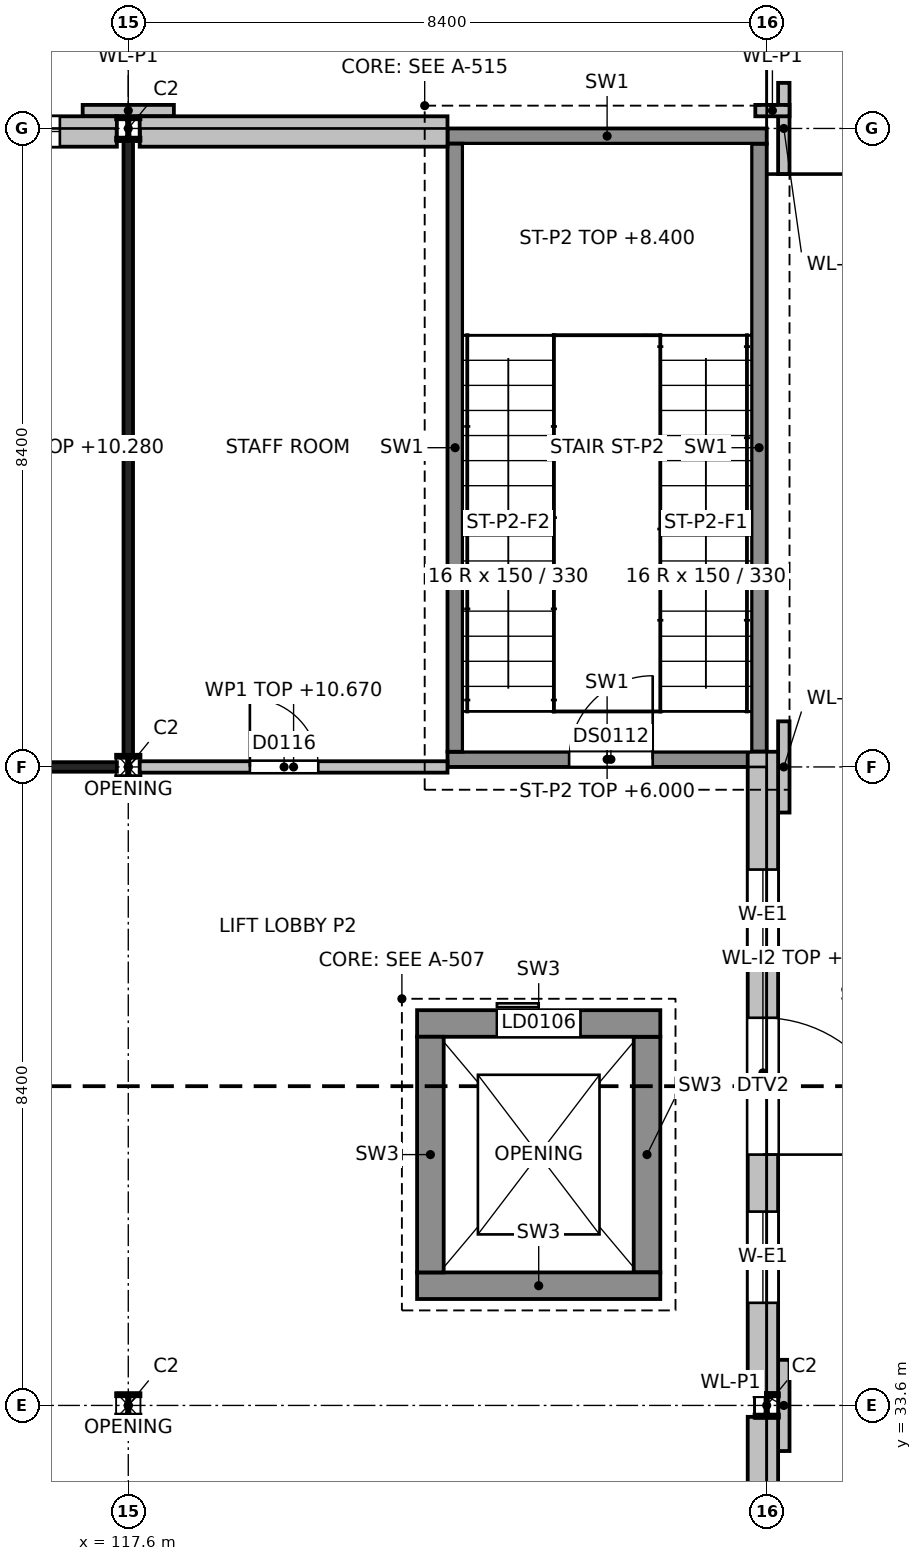
"""IFC4 building model, lengths in metres.
Left out: names, types, materials, properties, quantities, classifications, styles, units other than length and angle.
Written with IfcOpenShell. Run it as: python <this file> out.ifc"""

import sys

from ifc_helpers import new_model, si_unit, direction, frame, frame_2d, origin, origin_2d, place, context, subcontext, project, spatial, rectangle, i_section, extrude, element, fill, save


model = new_model("IFC4")
c1 = context("Model", 3, precision=1e-05, world=origin(), true_north=direction((0.0, 1.0)))
c2 = subcontext(c1, "Body", "Model", "MODEL_VIEW")
j1 = project(units=[si_unit("LENGTHUNIT", "METRE"), si_unit("PLANEANGLEUNIT", "RADIAN")], contexts=[c1])
p1 = place(None, origin())
s1 = spatial("IfcSite", under=j1, at=p1, CompositionType="ELEMENT")
p2 = place(p1, origin())
s2 = spatial("IfcBuilding", under=s1, at=p2, CompositionType="ELEMENT")
p3 = place(p2, frame((0.0, 0.0, 6.0)))
s3 = spatial("IfcBuildingStorey", under=s2, at=p3, CompositionType="ELEMENT", Elevation=6.0)
for number, where, z_axis, x_axis in (
    (1, (117.6, 33.6, 0.0), (0.0, 0.0, 1.0), (1.0, 0.0, 0.0)),
    (2, (117.6, 42.0, 0.0), (0.0, 0.0, 1.0), (1.0, 0.0, 0.0)),
    (3, (117.6, 50.4, 0.0), (0.0, 0.0, 1.0), (1.0, 0.0, 0.0)),
    (4, (126.0, 33.6, 0.0), (0.0, 0.0, 1.0), (1.0, 0.0, 0.0)),
):
    element("IfcColumn", number, at=place(p3, frame(where, z_axis=z_axis, x_axis=x_axis)), inside=s3, PredefinedType="COLUMN", context=c2, shape_type="SweptSolid", body=[
        extrude(i_section(OverallWidth=0.3, OverallDepth=0.3, WebThickness=0.011, FlangeThickness=0.019, at=origin_2d()), origin(), (0.0, 0.0, 1.0), 4.8),
    ])
p4 = place(p3, frame((121.8, 42.1, 0.0), z_axis=(0.0, 0.0, 1.0), x_axis=(1.0, 0.0, 0.0)))
e5 = element("IfcWall", 5, at=p4, inside=s3, PredefinedType="SHEAR", context=c2, shape_type="SweptSolid", body=[
    extrude(rectangle(XDim=4.2, YDim=0.2, at=frame_2d((2.1, 0.0))), origin(), (0.0, 0.0, 1.0), 4.8),
])
p5 = place(p4, frame((1.6, 0.0, 0.0)))
e6 = element("IfcOpeningElement", 6, at=p5, cuts=e5, PredefinedType="OPENING", context=c2, shape_type="SweptSolid", body=[
    extrude(rectangle(XDim=1.1, YDim=2.1, at=frame_2d((0.55, 1.05))), frame((0.0, 0.1, 0.0), z_axis=(0.0, -1.0, 0.0), x_axis=(1.0, 0.0, 0.0)), (0.0, 0.0, 1.0), 0.2),
])
p6 = place(p3, frame((121.8, 50.3, 0.0), z_axis=(0.0, 0.0, 1.0), x_axis=(1.0, 0.0, 0.0)))
e7 = element("IfcWall", 7, at=p6, inside=s3, PredefinedType="SHEAR", context=c2, shape_type="SweptSolid", body=[
    extrude(rectangle(XDim=4.2, YDim=0.2, at=frame_2d((2.1, 0.0))), origin(), (0.0, 0.0, 1.0), 4.8),
])
for number, where, z_axis, x_axis in (
    (8, (121.9, 42.2, 0.0), (0.0, 0.0, 1.0), (0.0, 1.0, 0.0)),
    (9, (125.9, 42.2, 0.0), (0.0, 0.0, 1.0), (0.0, 1.0, 0.0)),
):
    element("IfcWall", number, at=place(p3, frame(where, z_axis=z_axis, x_axis=x_axis)), inside=s3, PredefinedType="SHEAR", context=c2, shape_type="SweptSolid", body=[
        extrude(rectangle(XDim=8.0, YDim=0.2, at=frame_2d((4.0, 0.0))), origin(), (0.0, 0.0, 1.0), 4.8),
    ])
p7 = place(p3, frame((121.4, 35.175, 0.0), z_axis=(0.0, 0.0, 1.0), x_axis=(1.0, 0.0, 0.0)))
e10 = element("IfcWall", 10, at=p7, inside=s3, PredefinedType="SHEAR", context=c2, shape_type="SweptSolid", body=[
    extrude(rectangle(XDim=3.2, YDim=0.35, at=frame_2d((1.6, 0.0))), origin(), (0.0, 0.0, 1.0), 4.8),
])
p8 = place(p3, frame((121.4, 38.625, 0.0), z_axis=(0.0, 0.0, 1.0), x_axis=(1.0, 0.0, 0.0)))
e11 = element("IfcWall", 11, at=p8, inside=s3, PredefinedType="SHEAR", context=c2, shape_type="SweptSolid", body=[
    extrude(rectangle(XDim=3.2, YDim=0.35, at=frame_2d((1.6, 0.0))), origin(), (0.0, 0.0, 1.0), 4.8),
])
p9 = place(p8, frame((1.05, 0.0, 0.0)))
e12 = element("IfcOpeningElement", 12, at=p9, cuts=e11, PredefinedType="OPENING", context=c2, shape_type="SweptSolid", body=[
    extrude(rectangle(XDim=1.1, YDim=2.1, at=frame_2d((0.55, 1.05))), frame((0.0, 0.175, 0.0), z_axis=(0.0, -1.0, 0.0), x_axis=(1.0, 0.0, 0.0)), (0.0, 0.0, 1.0), 0.35),
])
for number, where, z_axis, x_axis in (
    (13, (121.575, 35.35, 0.0), (0.0, 0.0, 1.0), (0.0, 1.0, 0.0)),
    (14, (124.425, 35.35, 0.0), (0.0, 0.0, 1.0), (0.0, 1.0, 0.0)),
):
    element("IfcWall", number, at=place(p3, frame(where, z_axis=z_axis, x_axis=x_axis)), inside=s3, PredefinedType="SHEAR", context=c2, shape_type="SweptSolid", body=[
        extrude(rectangle(XDim=3.1, YDim=0.35, at=frame_2d((1.55, 0.0))), origin(), (0.0, 0.0, 1.0), 4.8),
    ])
p10 = place(p3, frame((109.2, 50.36, 0.0), z_axis=(0.0, 0.0, 1.0), x_axis=(1.0, 0.0, 0.0)))
e15 = element("IfcWall", 15, at=p10, inside=s3, PredefinedType="SOLIDWALL", context=c2, shape_type="SweptSolid", body=[
    extrude(rectangle(XDim=8.25, YDim=0.4, at=frame_2d((4.125, 0.0))), origin(), (0.0, 0.0, 1.0), 4.05),
])
p11 = place(p10, frame((0.9, 0.0, 0.9)))
e16 = element("IfcOpeningElement", 16, at=p11, cuts=e15, PredefinedType="OPENING", context=c2, shape_type="SweptSolid", body=[
    extrude(rectangle(XDim=3.0, YDim=3.0, at=frame_2d((1.5, 1.5))), frame((0.0, 0.2, 0.0), z_axis=(0.0, -1.0, 0.0), x_axis=(1.0, 0.0, 0.0)), (0.0, 0.0, 1.0), 0.4),
])
p12 = place(p10, frame((4.5, 0.0, 0.9)))
e17 = element("IfcOpeningElement", 17, at=p12, cuts=e15, PredefinedType="OPENING", context=c2, shape_type="SweptSolid", body=[
    extrude(rectangle(XDim=3.0, YDim=3.0, at=frame_2d((1.5, 1.5))), frame((0.0, 0.2, 0.0), z_axis=(0.0, -1.0, 0.0), x_axis=(1.0, 0.0, 0.0)), (0.0, 0.0, 1.0), 0.4),
])
p13 = place(p3, frame((117.75, 50.36, 0.0), z_axis=(0.0, 0.0, 1.0), x_axis=(1.0, 0.0, 0.0)))
e18 = element("IfcWall", 18, at=p13, inside=s3, PredefinedType="SOLIDWALL", context=c2, shape_type="SweptSolid", body=[
    extrude(rectangle(XDim=4.05, YDim=0.4, at=frame_2d((2.025, 0.0))), origin(), (0.0, 0.0, 1.0), 4.05),
])
p14 = place(p3, frame((117.0, 50.635, 0.0), z_axis=(0.0, 0.0, 1.0), x_axis=(1.0, 0.0, 0.0)))
e19 = element("IfcWall", 19, at=p14, inside=s3, PredefinedType="SOLIDWALL", context=c2, shape_type="SweptSolid", body=[
    extrude(rectangle(XDim=1.2, YDim=0.15, at=frame_2d((0.6, 0.0))), origin(), (0.0, 0.0, 1.0), 4.8),
])
p15 = place(p3, frame((125.85, 50.635, 0.0), z_axis=(0.0, 0.0, 1.0), x_axis=(1.0, 0.0, 0.0)))
e20 = element("IfcWall", 20, at=p15, inside=s3, PredefinedType="SOLIDWALL", context=c2, shape_type="SweptSolid", body=[
    extrude(rectangle(XDim=0.45, YDim=0.15, at=frame_2d((0.225, 0.0))), origin(), (0.0, 0.0, 1.0), 4.8),
])
p16 = place(p3, frame((125.95, 25.35, 0.0), z_axis=(0.0, 0.0, 1.0), x_axis=(0.0, 1.0, 0.0)))
e21 = element("IfcWall", 21, at=p16, inside=s3, PredefinedType="SOLIDWALL", context=c2, shape_type="SweptSolid", body=[
    extrude(rectangle(XDim=8.1, YDim=0.4, at=frame_2d((4.05, 0.0))), origin(), (0.0, 0.0, 1.0), 4.05),
])
p17 = place(p16, frame((3.15, 0.0, 0.0)))
e22 = element("IfcOpeningElement", 22, at=p17, cuts=e21, PredefinedType="OPENING", context=c2, shape_type="SweptSolid", body=[
    extrude(rectangle(XDim=1.8, YDim=2.4, at=frame_2d((0.9, 1.2))), frame((0.0, 0.2, 0.0), z_axis=(0.0, -1.0, 0.0), x_axis=(1.0, 0.0, 0.0)), (0.0, 0.0, 1.0), 0.4),
])
p18 = place(p16, frame((1.2, 0.0, 0.9)))
e23 = element("IfcOpeningElement", 23, at=p18, cuts=e21, PredefinedType="OPENING", context=c2, shape_type="SweptSolid", body=[
    extrude(rectangle(XDim=1.2, YDim=3.0, at=frame_2d((0.6, 1.5))), frame((0.0, 0.2, 0.0), z_axis=(0.0, -1.0, 0.0), x_axis=(1.0, 0.0, 0.0)), (0.0, 0.0, 1.0), 0.4),
])
p19 = place(p16, frame((5.7, 0.0, 0.9)))
e24 = element("IfcOpeningElement", 24, at=p19, cuts=e21, PredefinedType="OPENING", context=c2, shape_type="SweptSolid", body=[
    extrude(rectangle(XDim=1.2, YDim=3.0, at=frame_2d((0.6, 1.5))), frame((0.0, 0.2, 0.0), z_axis=(0.0, -1.0, 0.0), x_axis=(1.0, 0.0, 0.0)), (0.0, 0.0, 1.0), 0.4),
])
p20 = place(p3, frame((125.95, 33.75, 0.0), z_axis=(0.0, 0.0, 1.0), x_axis=(0.0, 1.0, 0.0)))
e25 = element("IfcWall", 25, at=p20, inside=s3, PredefinedType="SOLIDWALL", context=c2, shape_type="SweptSolid", body=[
    extrude(rectangle(XDim=8.45, YDim=0.4, at=frame_2d((4.225, 0.0))), origin(), (0.0, 0.0, 1.0), 4.05),
])
p21 = place(p20, frame((3.15, 0.0, 0.0)))
e26 = element("IfcOpeningElement", 26, at=p21, cuts=e25, PredefinedType="OPENING", context=c2, shape_type="SweptSolid", body=[
    extrude(rectangle(XDim=1.8, YDim=2.4, at=frame_2d((0.9, 1.2))), frame((0.0, 0.2, 0.0), z_axis=(0.0, -1.0, 0.0), x_axis=(1.0, 0.0, 0.0)), (0.0, 0.0, 1.0), 0.4),
])
p22 = place(p20, frame((1.2, 0.0, 0.9)))
e27 = element("IfcOpeningElement", 27, at=p22, cuts=e25, PredefinedType="OPENING", context=c2, shape_type="SweptSolid", body=[
    extrude(rectangle(XDim=1.2, YDim=3.0, at=frame_2d((0.6, 1.5))), frame((0.0, 0.2, 0.0), z_axis=(0.0, -1.0, 0.0), x_axis=(1.0, 0.0, 0.0)), (0.0, 0.0, 1.0), 0.4),
])
p23 = place(p20, frame((5.7, 0.0, 0.9)))
e28 = element("IfcOpeningElement", 28, at=p23, cuts=e25, PredefinedType="OPENING", context=c2, shape_type="SweptSolid", body=[
    extrude(rectangle(XDim=1.2, YDim=3.0, at=frame_2d((0.6, 1.5))), frame((0.0, 0.2, 0.0), z_axis=(0.0, -1.0, 0.0), x_axis=(1.0, 0.0, 0.0)), (0.0, 0.0, 1.0), 0.4),
])
p24 = place(p3, frame((126.225, 33.0, 0.0), z_axis=(0.0, 0.0, 1.0), x_axis=(0.0, 1.0, 0.0)))
e29 = element("IfcWall", 29, at=p24, inside=s3, PredefinedType="SOLIDWALL", context=c2, shape_type="SweptSolid", body=[
    extrude(rectangle(XDim=1.2, YDim=0.15, at=frame_2d((0.6, 0.0))), origin(), (0.0, 0.0, 1.0), 4.8),
])
p25 = place(p3, frame((126.225, 41.4, 0.0), z_axis=(0.0, 0.0, 1.0), x_axis=(0.0, 1.0, 0.0)))
e30 = element("IfcWall", 30, at=p25, inside=s3, PredefinedType="SOLIDWALL", context=c2, shape_type="SweptSolid", body=[
    extrude(rectangle(XDim=1.2, YDim=0.15, at=frame_2d((0.6, 0.0))), origin(), (0.0, 0.0, 1.0), 4.8),
])
p26 = place(p3, frame((126.225, 49.8, 0.0), z_axis=(0.0, 0.0, 1.0), x_axis=(0.0, 1.0, 0.0)))
e31 = element("IfcWall", 31, at=p26, inside=s3, PredefinedType="SOLIDWALL", context=c2, shape_type="SweptSolid", body=[
    extrude(rectangle(XDim=1.2, YDim=0.15, at=frame_2d((0.6, 0.0))), origin(), (0.0, 0.0, 1.0), 4.8),
])
p27 = place(p3, frame((109.2, 42.0, 0.0), z_axis=(0.0, 0.0, 1.0), x_axis=(1.0, 0.0, 0.0)))
e32 = element("IfcWall", 32, at=p27, inside=s3, PredefinedType="PARTITIONING", context=c2, shape_type="SweptSolid", body=[
    extrude(rectangle(XDim=8.25, YDim=0.125, at=frame_2d((4.125, 0.0))), origin(), (0.0, 0.0, 1.0), 4.28),
])
p28 = place(p27, frame((3.25, 0.0, 0.0)))
e33 = element("IfcOpeningElement", 33, at=p28, cuts=e32, PredefinedType="OPENING", context=c2, shape_type="SweptSolid", body=[
    extrude(rectangle(XDim=1.8, YDim=2.1, at=frame_2d((0.9, 1.05))), frame((0.0, 0.062, 0.0), z_axis=(0.0, -1.0, 0.0), x_axis=(1.0, 0.0, 0.0)), (0.0, 0.0, 1.0), 0.125),
])
p29 = place(p3, frame((117.75, 42.0, 0.0), z_axis=(0.0, 0.0, 1.0), x_axis=(1.0, 0.0, 0.0)))
e34 = element("IfcWall", 34, at=p29, inside=s3, PredefinedType="PARTITIONING", context=c2, shape_type="SweptSolid", body=[
    extrude(rectangle(XDim=4.05, YDim=0.15, at=frame_2d((2.025, 0.0))), origin(), (0.0, 0.0, 1.0), 4.67),
])
p30 = place(p29, frame((1.45, 0.0, 0.0)))
e35 = element("IfcOpeningElement", 35, at=p30, cuts=e34, PredefinedType="OPENING", context=c2, shape_type="SweptSolid", body=[
    extrude(rectangle(XDim=0.9, YDim=2.1, at=frame_2d((0.45, 1.05))), frame((0.0, 0.075, 0.0), z_axis=(0.0, -1.0, 0.0), x_axis=(1.0, 0.0, 0.0)), (0.0, 0.0, 1.0), 0.15),
])
p31 = place(p3, frame((117.6, 42.15, 0.0), z_axis=(0.0, 0.0, 1.0), x_axis=(0.0, 1.0, 0.0)))
e36 = element("IfcWall", 36, at=p31, inside=s3, PredefinedType="PARTITIONING", context=c2, shape_type="SweptSolid", body=[
    extrude(rectangle(XDim=8.1, YDim=0.125, at=frame_2d((4.05, 0.0))), origin(), (0.0, 0.0, 1.0), 4.28),
])
p32 = place(p12, origin())
e37 = element("IfcWindow", 37, at=p32, inside=s3, PartitioningType="SINGLE_PANEL", PredefinedType="WINDOW", context=c2, shape_type="SweptSolid", body=[
    extrude(rectangle(XDim=3.0, YDim=3.0, at=frame_2d((1.5, 1.5))), frame((0.0, 0.03, 0.0), z_axis=(0.0, -1.0, 0.0), x_axis=(1.0, 0.0, 0.0)), (0.0, 0.0, 1.0), 0.06),
])
fill(e17, e37)
p33 = place(p21, origin())
e38 = element("IfcDoor", 38, at=p33, inside=s3, OperationType="DOUBLE_DOOR_SINGLE_SWING", PredefinedType="DOOR", context=c2, shape_type="SweptSolid", body=[
    extrude(rectangle(XDim=1.8, YDim=2.4, at=frame_2d((0.9, 1.2))), frame((0.0, 0.025, 0.0), z_axis=(0.0, -1.0, 0.0), x_axis=(1.0, 0.0, 0.0)), (0.0, 0.0, 1.0), 0.05),
])
fill(e26, e38)
p34 = place(p22, origin())
e39 = element("IfcWindow", 39, at=p34, inside=s3, PartitioningType="SINGLE_PANEL", PredefinedType="WINDOW", context=c2, shape_type="SweptSolid", body=[
    extrude(rectangle(XDim=1.2, YDim=3.0, at=frame_2d((0.6, 1.5))), frame((0.0, 0.03, 0.0), z_axis=(0.0, -1.0, 0.0), x_axis=(1.0, 0.0, 0.0)), (0.0, 0.0, 1.0), 0.06),
])
fill(e27, e39)
p35 = place(p23, origin())
e40 = element("IfcWindow", 40, at=p35, inside=s3, PartitioningType="SINGLE_PANEL", PredefinedType="WINDOW", context=c2, shape_type="SweptSolid", body=[
    extrude(rectangle(XDim=1.2, YDim=3.0, at=frame_2d((0.6, 1.5))), frame((0.0, 0.03, 0.0), z_axis=(0.0, -1.0, 0.0), x_axis=(1.0, 0.0, 0.0)), (0.0, 0.0, 1.0), 0.06),
])
fill(e28, e40)
p36 = place(p30, origin())
e41 = element("IfcDoor", 41, at=p36, inside=s3, OperationType="SINGLE_SWING_LEFT", PredefinedType="DOOR", context=c2, shape_type="SweptSolid", body=[
    extrude(rectangle(XDim=0.9, YDim=2.1, at=frame_2d((0.45, 1.05))), frame((0.0, 0.025, 0.0), z_axis=(0.0, -1.0, 0.0), x_axis=(1.0, 0.0, 0.0)), (0.0, 0.0, 1.0), 0.05),
])
fill(e35, e41)
p37 = place(p5, origin())
e42 = element("IfcDoor", 42, at=p37, inside=s3, OperationType="SINGLE_SWING_RIGHT", PredefinedType="DOOR", context=c2, shape_type="SweptSolid", body=[
    extrude(rectangle(XDim=1.1, YDim=2.1, at=frame_2d((0.55, 1.05))), frame((0.0, 0.025, 0.0), z_axis=(0.0, -1.0, 0.0), x_axis=(1.0, 0.0, 0.0)), (0.0, 0.0, 1.0), 0.05),
])
fill(e6, e42)
p38 = place(p9, origin())
e43 = element("IfcDoor", 43, at=p38, inside=s3, OperationType="SLIDING_TO_RIGHT", PredefinedType="DOOR", context=c2, shape_type="SweptSolid", body=[
    extrude(rectangle(XDim=1.1, YDim=2.1, at=frame_2d((0.55, 1.05))), frame((0.0, 0.025, 0.0), z_axis=(0.0, -1.0, 0.0), x_axis=(1.0, 0.0, 0.0)), (0.0, 0.0, 1.0), 0.05),
])
fill(e12, e43)
save(model, sys.argv[1])
